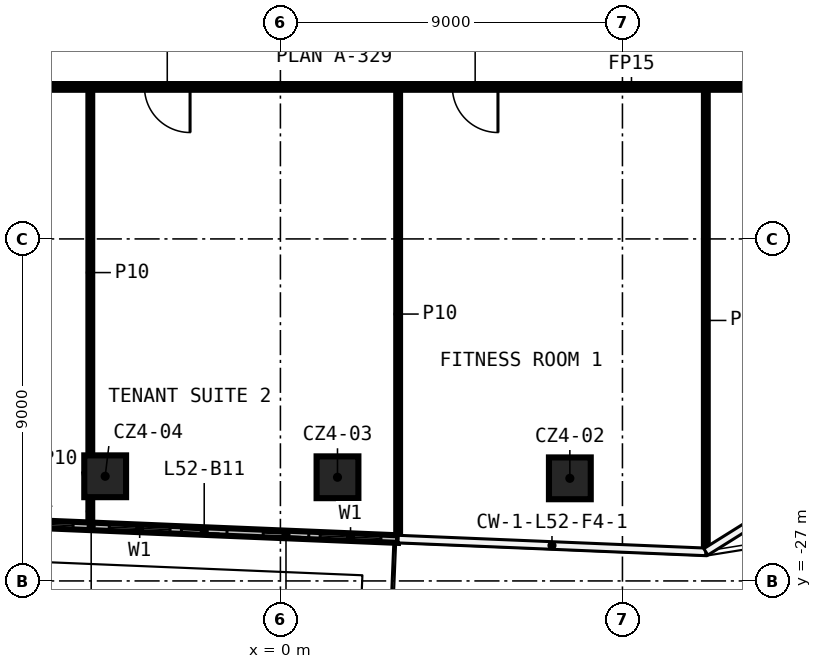
"""IFC4 building model, lengths in metres.
Left out: names, types, materials, properties, quantities, classifications, styles, units other than length and angle.
Written with IfcOpenShell. Run it as: python <this file> out.ifc"""

import sys

from ifc_helpers import new_model, si_unit, direction, frame, frame_2d, origin, origin_2d, place, context, subcontext, project, spatial, rectangle, extrude, element, fill, save


model = new_model("IFC4")
c1 = context("Model", 3, precision=1e-05, world=origin(), true_north=direction((0.0, 1.0)))
c2 = subcontext(c1, "Body", "Model", "MODEL_VIEW")
j1 = project(units=[si_unit("LENGTHUNIT", "METRE"), si_unit("PLANEANGLEUNIT", "RADIAN")], contexts=[c1])
p1 = place(None, origin())
s1 = spatial("IfcSite", under=j1, at=p1, CompositionType="ELEMENT")
p2 = place(p1, origin())
s2 = spatial("IfcBuilding", under=s1, at=p2, CompositionType="ELEMENT")
p3 = place(p2, frame((0.0, 0.0, 249.6)))
s3 = spatial("IfcBuildingStorey", under=s2, at=p3, CompositionType="ELEMENT", Elevation=249.6)
for number, where, z_axis, x_axis in (
    (1, (7.616, -24.3, 0.0), (0.0, 0.0, 1.0), (1.0, 0.0, 0.0)),
    (2, (1.502, -24.272, 0.0), (0.0, 0.0, 1.0), (1.0, 0.0, 0.0)),
    (3, (-4.611, -24.246, 0.0), (0.0, 0.0, 1.0), (1.0, 0.0, 0.0)),
):
    element("IfcColumn", number, at=place(p3, frame(where, z_axis=z_axis, x_axis=x_axis)), inside=s3, PredefinedType="COLUMN", context=c2, shape_type="SweptSolid", body=[
        extrude(rectangle(XDim=1.1, YDim=1.1, at=origin_2d()), origin(), (0.0, 0.0, 1.0), 3.82),
    ])
p4 = place(p3, frame((17.075, -14.0, 0.0), z_axis=(0.0, 0.0, 1.0), x_axis=(-1.0, 0.0, 0.0)))
e4 = element("IfcWall", 4, at=p4, inside=s3, PredefinedType="PARTITIONING", context=c2, shape_type="SweptSolid", body=[
    extrude(rectangle(XDim=26.15, YDim=0.15, at=frame_2d((13.075, 0.0))), origin(), (0.0, 0.0, 1.0), 3.82),
])
p5 = place(p4, frame((23.476, 0.0, 0.0)))
e5 = element("IfcOpeningElement", 5, at=p5, cuts=e4, PredefinedType="OPENING", context=c2, shape_type="SweptSolid", body=[
    extrude(rectangle(XDim=1.2, YDim=2.1, at=frame_2d((0.6, 1.05))), frame((0.0, 0.085, 0.0), z_axis=(0.0, -1.0, 0.0), x_axis=(1.0, 0.0, 0.0)), (0.0, 0.0, 1.0), 0.17),
])
p6 = place(p4, frame((19.452, 0.0, 0.0)))
e6 = element("IfcOpeningElement", 6, at=p6, cuts=e4, PredefinedType="OPENING", context=c2, shape_type="SweptSolid", body=[
    extrude(rectangle(XDim=1.2, YDim=2.1, at=frame_2d((0.6, 1.05))), frame((0.0, 0.085, 0.0), z_axis=(0.0, -1.0, 0.0), x_axis=(1.0, 0.0, 0.0)), (0.0, 0.0, 1.0), 0.17),
])
p7 = place(p4, frame((11.351, 0.0, 0.0)))
e7 = element("IfcOpeningElement", 7, at=p7, cuts=e4, PredefinedType="OPENING", context=c2, shape_type="SweptSolid", body=[
    extrude(rectangle(XDim=1.2, YDim=2.1, at=frame_2d((0.6, 1.05))), frame((0.0, 0.085, 0.0), z_axis=(0.0, -1.0, 0.0), x_axis=(1.0, 0.0, 0.0)), (0.0, 0.0, 1.0), 0.17),
])
p8 = place(p4, frame((3.125, 0.0, 0.0)))
e8 = element("IfcOpeningElement", 8, at=p8, cuts=e4, PredefinedType="OPENING", context=c2, shape_type="SweptSolid", body=[
    extrude(rectangle(XDim=1.2, YDim=2.1, at=frame_2d((0.6, 1.05))), frame((0.0, 0.085, 0.0), z_axis=(0.0, -1.0, 0.0), x_axis=(1.0, 0.0, 0.0)), (0.0, 0.0, 1.0), 0.17),
])
p9 = place(p3, frame((11.194, -26.215, 0.0), z_axis=(0.0, 0.0, 1.0), x_axis=(0.0, 1.0, 0.0)))
e9 = element("IfcWall", 9, at=p9, inside=s3, PredefinedType="PARTITIONING", context=c2, shape_type="SweptSolid", body=[
    extrude(rectangle(XDim=12.14, YDim=0.1, at=frame_2d((6.07, 0.0))), origin(), (0.0, 0.0, 1.0), 3.82),
])
p10 = place(p3, frame((3.098, -25.879, 0.0), z_axis=(0.0, 0.0, 1.0), x_axis=(0.0, 1.0, 0.0)))
e10 = element("IfcWall", 10, at=p10, inside=s3, PredefinedType="PARTITIONING", context=c2, shape_type="SweptSolid", body=[
    extrude(rectangle(XDim=11.804, YDim=0.1, at=frame_2d((5.902, 0.0))), origin(), (0.0, 0.0, 1.0), 3.82),
])
p11 = place(p3, frame((-5.002, -25.543, 0.0), z_axis=(0.0, 0.0, 1.0), x_axis=(0.0, 1.0, 0.0)))
e11 = element("IfcWall", 11, at=p11, inside=s3, PredefinedType="PARTITIONING", context=c2, shape_type="SweptSolid", body=[
    extrude(rectangle(XDim=0.747, YDim=0.1, at=frame_2d((0.374, 0.0))), origin(), (0.0, 0.0, 1.0), 3.82),
])
p12 = place(p3, frame((-5.002, -23.696, 0.0), z_axis=(0.0, 0.0, 1.0), x_axis=(0.0, 1.0, 0.0)))
e12 = element("IfcWall", 12, at=p12, inside=s3, PredefinedType="PARTITIONING", context=c2, shape_type="SweptSolid", body=[
    extrude(rectangle(XDim=9.621, YDim=0.1, at=frame_2d((4.811, 0.0))), origin(), (0.0, 0.0, 1.0), 3.82),
])
p13 = place(p3, frame((-9.052, -25.395, 0.0), z_axis=(0.0, 0.0, 1.0), x_axis=(0.999139463312, -0.041476895419, 0.0)))
e13 = element("IfcWall", 13, at=p13, inside=s3, PredefinedType="SOLIDWALL", context=c2, shape_type="SweptSolid", body=[
    extrude(rectangle(XDim=12.161, YDim=0.2, at=frame_2d((6.081, 0.0))), origin(), (0.0, 0.0, 1.0), 3.82),
])
p14 = place(p13, frame((2.0, 0.0, 0.6)))
e14 = element("IfcOpeningElement", 14, at=p14, cuts=e13, PredefinedType="OPENING", context=c2, shape_type="SweptSolid", body=[
    extrude(rectangle(XDim=1.6, YDim=2.4, at=frame_2d((0.8, 1.2))), frame((0.0, 0.11, 0.0), z_axis=(0.0, -1.0, 0.0), x_axis=(1.0, 0.0, 0.0)), (0.0, 0.0, 1.0), 0.22),
])
p15 = place(p13, frame((0.5, 0.0, 0.0)))
e15 = element("IfcOpeningElement", 15, at=p15, cuts=e13, PredefinedType="OPENING", context=c2, shape_type="SweptSolid", body=[
    extrude(rectangle(XDim=1.2, YDim=2.4, at=frame_2d((0.6, 1.2))), frame((0.0, 0.11, 0.0), z_axis=(0.0, -1.0, 0.0), x_axis=(1.0, 0.0, 0.0)), (0.0, 0.0, 1.0), 0.22),
])
p16 = place(p13, frame((4.554, 0.0, 0.6)))
e16 = element("IfcOpeningElement", 16, at=p16, cuts=e13, PredefinedType="OPENING", context=c2, shape_type="SweptSolid", body=[
    extrude(rectangle(XDim=1.6, YDim=2.4, at=frame_2d((0.8, 1.2))), frame((0.0, 0.11, 0.0), z_axis=(0.0, -1.0, 0.0), x_axis=(1.0, 0.0, 0.0)), (0.0, 0.0, 1.0), 0.22),
])
p17 = place(p13, frame((6.454, 0.0, 0.0)))
e17 = element("IfcOpeningElement", 17, at=p17, cuts=e13, PredefinedType="OPENING", context=c2, shape_type="SweptSolid", body=[
    extrude(rectangle(XDim=1.2, YDim=2.4, at=frame_2d((0.6, 1.2))), frame((0.0, 0.11, 0.0), z_axis=(0.0, -1.0, 0.0), x_axis=(1.0, 0.0, 0.0)), (0.0, 0.0, 1.0), 0.22),
])
p18 = place(p13, frame((10.107, 0.0, 0.6)))
e18 = element("IfcOpeningElement", 18, at=p18, cuts=e13, PredefinedType="OPENING", context=c2, shape_type="SweptSolid", body=[
    extrude(rectangle(XDim=1.6, YDim=2.4, at=frame_2d((0.8, 1.2))), frame((0.0, 0.11, 0.0), z_axis=(0.0, -1.0, 0.0), x_axis=(1.0, 0.0, 0.0)), (0.0, 0.0, 1.0), 0.22),
])
p19 = place(p13, frame((8.607, 0.0, 0.0)))
e19 = element("IfcOpeningElement", 19, at=p19, cuts=e13, PredefinedType="OPENING", context=c2, shape_type="SweptSolid", body=[
    extrude(rectangle(XDim=1.2, YDim=2.4, at=frame_2d((0.6, 1.2))), frame((0.0, 0.11, 0.0), z_axis=(0.0, -1.0, 0.0), x_axis=(1.0, 0.0, 0.0)), (0.0, 0.0, 1.0), 0.22),
])
p20 = place(p6, origin())
e20 = element("IfcDoor", 20, at=p20, inside=s3, OperationType="SINGLE_SWING_LEFT", PredefinedType="DOOR", context=c2, shape_type="SweptSolid", body=[
    extrude(rectangle(XDim=1.2, YDim=2.1, at=frame_2d((0.6, 1.05))), frame((0.0, 0.025, 0.0), z_axis=(0.0, -1.0, 0.0), x_axis=(1.0, 0.0, 0.0)), (0.0, 0.0, 1.0), 0.05),
])
fill(e6, e20)
p21 = place(p7, origin())
e21 = element("IfcDoor", 21, at=p21, inside=s3, OperationType="SINGLE_SWING_RIGHT", PredefinedType="DOOR", context=c2, shape_type="SweptSolid", body=[
    extrude(rectangle(XDim=1.2, YDim=2.1, at=frame_2d((0.6, 1.05))), frame((0.0, 0.025, 0.0), z_axis=(0.0, -1.0, 0.0), x_axis=(1.0, 0.0, 0.0)), (0.0, 0.0, 1.0), 0.05),
])
fill(e7, e21)
p22 = place(p14, origin())
e22 = element("IfcWindow", 22, at=p22, inside=s3, PartitioningType="SINGLE_PANEL", PredefinedType="WINDOW", context=c2, shape_type="SweptSolid", body=[
    extrude(rectangle(XDim=1.6, YDim=2.4, at=frame_2d((0.8, 1.2))), frame((0.0, 0.03, 0.0), z_axis=(0.0, -1.0, 0.0), x_axis=(1.0, 0.0, 0.0)), (0.0, 0.0, 1.0), 0.06),
])
fill(e14, e22)
p23 = place(p16, origin())
e23 = element("IfcWindow", 23, at=p23, inside=s3, PartitioningType="SINGLE_PANEL", PredefinedType="WINDOW", context=c2, shape_type="SweptSolid", body=[
    extrude(rectangle(XDim=1.6, YDim=2.4, at=frame_2d((0.8, 1.2))), frame((0.0, 0.03, 0.0), z_axis=(0.0, -1.0, 0.0), x_axis=(1.0, 0.0, 0.0)), (0.0, 0.0, 1.0), 0.06),
])
fill(e16, e23)
p24 = place(p17, origin())
e24 = element("IfcDoor", 24, at=p24, inside=s3, OperationType="SLIDING_TO_LEFT", PredefinedType="DOOR", context=c2, shape_type="SweptSolid", body=[
    extrude(rectangle(XDim=1.2, YDim=2.4, at=frame_2d((0.6, 1.2))), frame((0.0, 0.025, 0.0), z_axis=(0.0, -1.0, 0.0), x_axis=(1.0, 0.0, 0.0)), (0.0, 0.0, 1.0), 0.05),
])
fill(e17, e24)
p25 = place(p18, origin())
e25 = element("IfcWindow", 25, at=p25, inside=s3, PartitioningType="SINGLE_PANEL", PredefinedType="WINDOW", context=c2, shape_type="SweptSolid", body=[
    extrude(rectangle(XDim=1.6, YDim=2.4, at=frame_2d((0.8, 1.2))), frame((0.0, 0.03, 0.0), z_axis=(0.0, -1.0, 0.0), x_axis=(1.0, 0.0, 0.0)), (0.0, 0.0, 1.0), 0.06),
])
fill(e18, e25)
p26 = place(p19, origin())
e26 = element("IfcDoor", 26, at=p26, inside=s3, OperationType="SLIDING_TO_LEFT", PredefinedType="DOOR", context=c2, shape_type="SweptSolid", body=[
    extrude(rectangle(XDim=1.2, YDim=2.4, at=frame_2d((0.6, 1.2))), frame((0.0, 0.025, 0.0), z_axis=(0.0, -1.0, 0.0), x_axis=(1.0, 0.0, 0.0)), (0.0, 0.0, 1.0), 0.05),
])
fill(e19, e26)
save(model, sys.argv[1])
